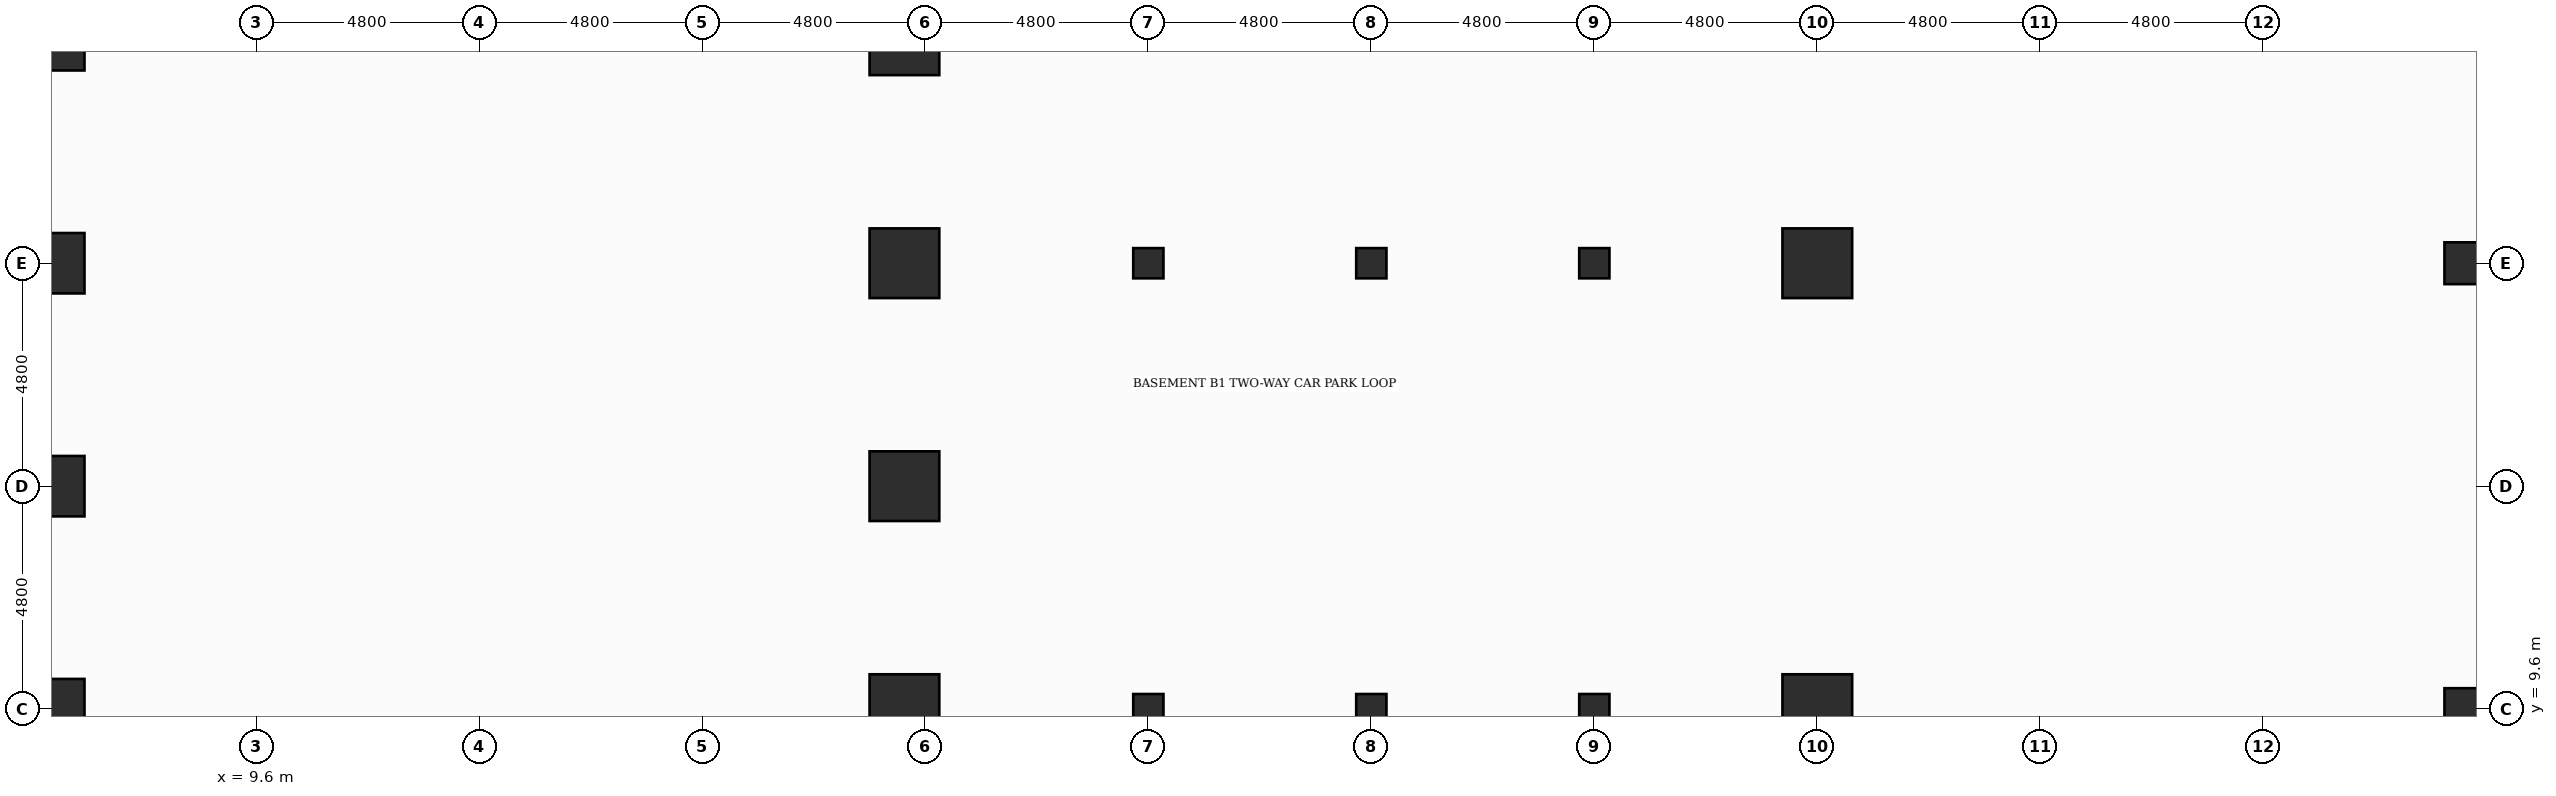
"""IFC4 building model, lengths in metres.
Left out: names, types, materials, properties, quantities, classifications, styles, units other than length and angle.
Written with IfcOpenShell. Run it as: python <this file> out.ifc"""

import sys

from ifc_helpers import new_model, si_unit, direction, frame, origin, origin_2d, place, context, subcontext, project, spatial, rectangle, circle, extrude, element, save


model = new_model("IFC4")
c1 = context("Model", 3, precision=1e-05, world=origin(), true_north=direction((0.0, 1.0)))
c2 = subcontext(c1, "Body", "Model", "MODEL_VIEW")
j1 = project(units=[si_unit("LENGTHUNIT", "METRE"), si_unit("PLANEANGLEUNIT", "RADIAN")], contexts=[c1])
p1 = place(None, origin())
s1 = spatial("IfcSite", under=j1, at=p1, CompositionType="ELEMENT")
p2 = place(p1, origin())
s2 = spatial("IfcBuilding", under=s1, at=p2, CompositionType="ELEMENT")
p3 = place(p2, frame((0.0, 0.0, -4.4)))
s3 = spatial("IfcBuildingStorey", under=s2, at=p3, CompositionType="ELEMENT", Elevation=-4.4)
for number, where, z_axis, x_axis in (
    (1, (5.25, 9.6, 0.0), (0.0, 0.0, 1.0), (1.0, 0.0, 0.0)),
    (2, (5.25, 14.4, 0.0), (0.0, 0.0, 1.0), (1.0, 0.0, 0.0)),
    (3, (5.25, 19.2, 0.0), (0.0, 0.0, 1.0), (1.0, 0.0, 0.0)),
    (4, (5.25, 24.0, 0.0), (0.0, 0.0, 1.0), (1.0, 0.0, 0.0)),
):
    element("IfcColumn", number, at=place(p3, frame(where, z_axis=z_axis, x_axis=x_axis)), inside=s3, PredefinedType="COLUMN", context=c2, shape_type="SweptSolid", body=[
        extrude(rectangle(XDim=1.3, YDim=1.3, at=origin_2d()), origin(), (0.0, 0.0, 1.0), 4.4),
    ])
for number, where, z_axis, x_axis in (
    (5, (23.55, 9.6, 0.0), (0.0, 0.0, 1.0), (1.0, 0.0, 0.0)),
    (6, (23.55, 14.4, 0.0), (0.0, 0.0, 1.0), (1.0, 0.0, 0.0)),
    (7, (23.55, 19.2, 0.0), (0.0, 0.0, 1.0), (1.0, 0.0, 0.0)),
    (8, (23.55, 24.0, 0.0), (0.0, 0.0, 1.0), (1.0, 0.0, 0.0)),
):
    element("IfcColumn", number, at=place(p3, frame(where, z_axis=z_axis, x_axis=x_axis)), inside=s3, PredefinedType="USERDEFINED", context=c2, shape_type="SweptSolid", body=[
        extrude(rectangle(XDim=1.5, YDim=1.5, at=origin_2d()), origin(), (0.0, 0.0, 1.0), 4.4),
    ])
for number, where, z_axis, x_axis in (
    (9, (28.8, 9.6, 0.0), (0.0, 0.0, 1.0), (1.0, 0.0, 0.0)),
    (10, (28.8, 19.2, 0.0), (0.0, 0.0, 1.0), (1.0, 0.0, 0.0)),
    (11, (33.6, 9.6, 0.0), (0.0, 0.0, 1.0), (1.0, 0.0, 0.0)),
    (12, (33.6, 19.2, 0.0), (0.0, 0.0, 1.0), (1.0, 0.0, 0.0)),
    (13, (38.4, 9.6, 0.0), (0.0, 0.0, 1.0), (1.0, 0.0, 0.0)),
    (14, (38.4, 19.2, 0.0), (0.0, 0.0, 1.0), (1.0, 0.0, 0.0)),
):
    element("IfcColumn", number, at=place(p3, frame(where, z_axis=z_axis, x_axis=x_axis)), inside=s3, PredefinedType="PILASTER", context=c2, shape_type="SweptSolid", body=[
        extrude(rectangle(XDim=0.65, YDim=0.65, at=origin_2d()), origin(), (0.0, 0.0, 1.0), 4.4),
    ])
for number, where, z_axis, x_axis in (
    (15, (43.2, 9.6, 0.0), (0.0, 0.0, 1.0), (1.0, 0.0, 0.0)),
    (16, (43.2, 19.2, 0.0), (0.0, 0.0, 1.0), (1.0, 0.0, 0.0)),
):
    element("IfcColumn", number, at=place(p3, frame(where, z_axis=z_axis, x_axis=x_axis)), inside=s3, PredefinedType="USERDEFINED", context=c2, shape_type="SweptSolid", body=[
        extrude(rectangle(XDim=1.5, YDim=1.5, at=origin_2d()), origin(), (0.0, 0.0, 1.0), 4.4),
    ])
for number, where, z_axis, x_axis in (
    (17, (57.15, 9.6, 0.0), (0.0, 0.0, 1.0), (1.0, 0.0, 0.0)),
    (18, (57.15, 19.2, 0.0), (0.0, 0.0, 1.0), (1.0, 0.0, 0.0)),
):
    element("IfcColumn", number, at=place(p3, frame(where, z_axis=z_axis, x_axis=x_axis)), inside=s3, PredefinedType="COLUMN", context=c2, shape_type="SweptSolid", body=[
        extrude(circle(Radius=0.45, at=origin_2d()), origin(), (0.0, 0.0, 1.0), 4.4),
    ])
save(model, sys.argv[1])
